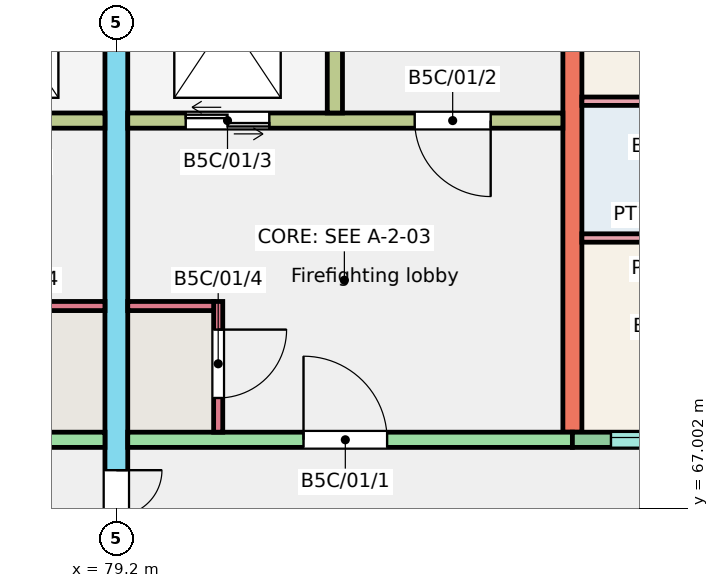
"""IFC4 building model, lengths in metres.
Left out: names, types, materials, properties, quantities, classifications, styles, units other than length and angle.
Written with IfcOpenShell. Run it as: python <this file> out.ifc"""

import sys

from ifc_helpers import new_model, si_unit, direction, frame, frame_2d, origin, place, context, subcontext, project, spatial, rectangle, extrude, element, fill, save


model = new_model("IFC4")
c1 = context("Model", 3, precision=1e-05, world=origin(), true_north=direction((0.0, 1.0)))
c2 = subcontext(c1, "Body", "Model", "MODEL_VIEW")
j1 = project(units=[si_unit("LENGTHUNIT", "METRE"), si_unit("PLANEANGLEUNIT", "RADIAN")], contexts=[c1])
p1 = place(None, origin())
s1 = spatial("IfcSite", under=j1, at=p1, CompositionType="ELEMENT")
p2 = place(p1, origin())
s2 = spatial("IfcBuilding", under=s1, at=p2, CompositionType="ELEMENT")
p3 = place(p2, frame((0.0, 0.0, 3.0)))
s3 = spatial("IfcBuildingStorey", under=s2, at=p3, CompositionType="ELEMENT", Elevation=3.0)
p4 = place(p3, frame((79.2, 66.0, 0.0), z_axis=(0.0, 0.0, 1.0), x_axis=(0.0, 1.0, 0.0)))
e1 = element("IfcWall", 1, at=p4, inside=s3, PredefinedType="SHEAR", context=c2, shape_type="SweptSolid", body=[
    extrude(rectangle(XDim=11.0, YDim=0.3, at=frame_2d((5.5, 0.0))), origin(), (0.0, 0.0, 1.0), 3.0),
])
p5 = place(p4, frame((0.3, 0.0, 0.0)))
e2 = element("IfcOpeningElement", 2, at=p5, cuts=e1, PredefinedType="OPENING", context=c2, shape_type="SweptSolid", body=[
    extrude(rectangle(XDim=1.2, YDim=2.1, at=frame_2d((0.6, 1.05))), frame((0.0, 0.16, 0.0), z_axis=(0.0, -1.0, 0.0), x_axis=(1.0, 0.0, 0.0)), (0.0, 0.0, 1.0), 0.32),
])
p6 = place(p3, frame((85.2, 68.0, 0.0), z_axis=(0.0, 0.0, 1.0), x_axis=(0.0, 1.0, 0.0)))
e3 = element("IfcWall", 3, at=p6, inside=s3, PredefinedType="SHEAR", context=c2, shape_type="SweptSolid", body=[
    extrude(rectangle(XDim=9.0, YDim=0.25, at=frame_2d((4.5, 0.0))), origin(), (0.0, 0.0, 1.0), 3.0),
])
p7 = place(p3, frame((73.2, 67.9, 0.0), z_axis=(0.0, 0.0, 1.0), x_axis=(1.0, 0.0, 0.0)))
e4 = element("IfcWall", 4, at=p7, inside=s3, PredefinedType="SHEAR", context=c2, shape_type="SweptSolid", body=[
    extrude(rectangle(XDim=5.85, YDim=0.2, at=frame_2d((2.925, 0.0))), origin(), (0.0, 0.0, 1.0), 3.0),
])
p8 = place(p7, frame((2.438, 0.0, 0.0)))
e5 = element("IfcOpeningElement", 5, at=p8, cuts=e4, PredefinedType="OPENING", context=c2, shape_type="SweptSolid", body=[
    extrude(rectangle(XDim=1.1, YDim=2.1, at=frame_2d((0.55, 1.05))), frame((0.0, 0.11, 0.0), z_axis=(0.0, -1.0, 0.0), x_axis=(1.0, 0.0, 0.0)), (0.0, 0.0, 1.0), 0.22),
])
p9 = place(p3, frame((73.325, 72.1, 0.0), z_axis=(0.0, 0.0, 1.0), x_axis=(1.0, 0.0, 0.0)))
e6 = element("IfcWall", 6, at=p9, inside=s3, PredefinedType="SHEAR", context=c2, shape_type="SweptSolid", body=[
    extrude(rectangle(XDim=5.725, YDim=0.2, at=frame_2d((2.863, 0.0))), origin(), (0.0, 0.0, 1.0), 3.0),
])
p10 = place(p9, frame((0.95, 0.0, 0.0)))
e7 = element("IfcOpeningElement", 7, at=p10, cuts=e6, PredefinedType="OPENING", context=c2, shape_type="SweptSolid", body=[
    extrude(rectangle(XDim=1.0, YDim=2.1, at=frame_2d((0.5, 1.05))), frame((0.0, 0.11, 0.0), z_axis=(0.0, -1.0, 0.0), x_axis=(1.0, 0.0, 0.0)), (0.0, 0.0, 1.0), 0.22),
])
p11 = place(p9, frame((3.863, 0.0, 0.0)))
e8 = element("IfcOpeningElement", 8, at=p11, cuts=e6, PredefinedType="OPENING", context=c2, shape_type="SweptSolid", body=[
    extrude(rectangle(XDim=1.1, YDim=2.1, at=frame_2d((0.55, 1.05))), frame((0.0, 0.11, 0.0), z_axis=(0.0, -1.0, 0.0), x_axis=(1.0, 0.0, 0.0)), (0.0, 0.0, 1.0), 0.22),
])
p12 = place(p3, frame((77.92, 69.66, 0.0), z_axis=(0.0, 0.0, 1.0), x_axis=(1.0, 0.0, 0.0)))
e9 = element("IfcWall", 9, at=p12, inside=s3, PredefinedType="SHEAR", context=c2, shape_type="SweptSolid", body=[
    extrude(rectangle(XDim=1.13, YDim=0.12, at=frame_2d((0.565, 0.0))), origin(), (0.0, 0.0, 1.0), 3.0),
])
p13 = place(p3, frame((79.35, 67.9, 0.0), z_axis=(0.0, 0.0, 1.0), x_axis=(1.0, 0.0, 0.0)))
e10 = element("IfcWall", 10, at=p13, inside=s3, PredefinedType="SHEAR", context=c2, shape_type="SweptSolid", body=[
    extrude(rectangle(XDim=5.85, YDim=0.2, at=frame_2d((2.925, 0.0))), origin(), (0.0, 0.0, 1.0), 3.0),
])
p14 = place(p13, frame((2.312, 0.0, 0.0)))
e11 = element("IfcOpeningElement", 11, at=p14, cuts=e10, PredefinedType="OPENING", context=c2, shape_type="SweptSolid", body=[
    extrude(rectangle(XDim=1.1, YDim=2.1, at=frame_2d((0.55, 1.05))), frame((0.0, 0.11, 0.0), z_axis=(0.0, -1.0, 0.0), x_axis=(1.0, 0.0, 0.0)), (0.0, 0.0, 1.0), 0.22),
])
p15 = place(p3, frame((79.35, 72.1, 0.0), z_axis=(0.0, 0.0, 1.0), x_axis=(1.0, 0.0, 0.0)))
e12 = element("IfcWall", 12, at=p15, inside=s3, PredefinedType="SHEAR", context=c2, shape_type="SweptSolid", body=[
    extrude(rectangle(XDim=5.725, YDim=0.2, at=frame_2d((2.862, 0.0))), origin(), (0.0, 0.0, 1.0), 3.0),
])
p16 = place(p15, frame((3.775, 0.0, 0.0)))
e13 = element("IfcOpeningElement", 13, at=p16, cuts=e12, PredefinedType="OPENING", context=c2, shape_type="SweptSolid", body=[
    extrude(rectangle(XDim=1.0, YDim=2.1, at=frame_2d((0.5, 1.05))), frame((0.0, 0.11, 0.0), z_axis=(0.0, -1.0, 0.0), x_axis=(1.0, 0.0, 0.0)), (0.0, 0.0, 1.0), 0.22),
])
p17 = place(p15, frame((0.762, 0.0, 0.0)))
e14 = element("IfcOpeningElement", 14, at=p17, cuts=e12, PredefinedType="OPENING", context=c2, shape_type="SweptSolid", body=[
    extrude(rectangle(XDim=1.1, YDim=2.1, at=frame_2d((0.55, 1.05))), frame((0.0, 0.11, 0.0), z_axis=(0.0, -1.0, 0.0), x_axis=(1.0, 0.0, 0.0)), (0.0, 0.0, 1.0), 0.22),
])
p18 = place(p3, frame((82.075, 72.2, 0.0), z_axis=(0.0, 0.0, 1.0), x_axis=(0.0, 1.0, 0.0)))
e15 = element("IfcWall", 15, at=p18, inside=s3, PredefinedType="SHEAR", context=c2, shape_type="SweptSolid", body=[
    extrude(rectangle(XDim=4.8, YDim=0.2, at=frame_2d((2.4, 0.0))), origin(), (0.0, 0.0, 1.0), 3.0),
])
p19 = place(p3, frame((80.54, 68.0, 0.0), z_axis=(0.0, 0.0, 1.0), x_axis=(0.0, 1.0, 0.0)))
e16 = element("IfcWall", 16, at=p19, inside=s3, PredefinedType="SHEAR", context=c2, shape_type="SweptSolid", body=[
    extrude(rectangle(XDim=1.72, YDim=0.12, at=frame_2d((0.86, 0.0))), origin(), (0.0, 0.0, 1.0), 3.0),
])
p20 = place(p19, frame((0.45, 0.0, 0.0)))
e17 = element("IfcOpeningElement", 17, at=p20, cuts=e16, PredefinedType="OPENING", context=c2, shape_type="SweptSolid", body=[
    extrude(rectangle(XDim=0.9, YDim=2.1, at=frame_2d((0.45, 1.05))), frame((0.0, 0.07, 0.0), z_axis=(0.0, -1.0, 0.0), x_axis=(1.0, 0.0, 0.0)), (0.0, 0.0, 1.0), 0.14),
])
p21 = place(p3, frame((79.35, 69.66, 0.0), z_axis=(0.0, 0.0, 1.0), x_axis=(1.0, 0.0, 0.0)))
e18 = element("IfcWall", 18, at=p21, inside=s3, PredefinedType="SHEAR", context=c2, shape_type="SweptSolid", body=[
    extrude(rectangle(XDim=1.13, YDim=0.12, at=frame_2d((0.565, 0.0))), origin(), (0.0, 0.0, 1.0), 3.0),
])
p22 = place(p3, frame((85.2, 67.9, 0.0), z_axis=(0.0, 0.0, 1.0), x_axis=(1.0, 0.0, 0.0)))
e19 = element("IfcWall", 19, at=p22, inside=s3, PredefinedType="SOLIDWALL", context=c2, shape_type="SweptSolid", body=[
    extrude(rectangle(XDim=3.6, YDim=0.2, at=frame_2d((1.8, 0.0))), origin(), (0.0, 0.0, 1.0), 3.0),
])
p23 = place(p22, frame((0.508, 0.0, 1.1)))
e20 = element("IfcOpeningElement", 20, at=p23, cuts=e19, PredefinedType="OPENING", context=c2, shape_type="SweptSolid", body=[
    extrude(rectangle(XDim=1.2, YDim=1.3, at=frame_2d((0.6, 0.65))), frame((0.0, 0.11, 0.0), z_axis=(0.0, -1.0, 0.0), x_axis=(1.0, 0.0, 0.0)), (0.0, 0.0, 1.0), 0.22),
])
p24 = place(p22, frame((2.35, 0.0, 0.0)))
e21 = element("IfcOpeningElement", 21, at=p24, cuts=e19, PredefinedType="OPENING", context=c2, shape_type="SweptSolid", body=[
    extrude(rectangle(XDim=1.0, YDim=2.1, at=frame_2d((0.5, 1.05))), frame((0.0, 0.11, 0.0), z_axis=(0.0, -1.0, 0.0), x_axis=(1.0, 0.0, 0.0)), (0.0, 0.0, 1.0), 0.22),
])
p25 = place(p3, frame((85.325, 70.555, 0.0), z_axis=(0.0, 0.0, 1.0), x_axis=(1.0, 0.0, 0.0)))
e22 = element("IfcWall", 22, at=p25, inside=s3, PredefinedType="PARTITIONING", context=c2, shape_type="SweptSolid", body=[
    extrude(rectangle(XDim=1.965, YDim=0.11, at=frame_2d((0.982, 0.0))), origin(), (0.0, 0.0, 1.0), 2.8),
])
p26 = place(p3, frame((85.325, 72.355, 0.0), z_axis=(0.0, 0.0, 1.0), x_axis=(1.0, 0.0, 0.0)))
e23 = element("IfcWall", 23, at=p26, inside=s3, PredefinedType="PARTITIONING", context=c2, shape_type="SweptSolid", body=[
    extrude(rectangle(XDim=3.375, YDim=0.11, at=frame_2d((1.688, 0.0))), origin(), (0.0, 0.0, 1.0), 2.8),
])
p27 = place(p26, frame((2.275, 0.0, 0.0)))
e24 = element("IfcOpeningElement", 24, at=p27, cuts=e23, PredefinedType="OPENING", context=c2, shape_type="SweptSolid", body=[
    extrude(rectangle(XDim=0.9, YDim=2.1, at=frame_2d((0.45, 1.05))), frame((0.0, 0.065, 0.0), z_axis=(0.0, -1.0, 0.0), x_axis=(1.0, 0.0, 0.0)), (0.0, 0.0, 1.0), 0.13),
])
p28 = place(p23, origin())
e25 = element("IfcWindow", 25, at=p28, inside=s3, PartitioningType="SINGLE_PANEL", PredefinedType="WINDOW", context=c2, shape_type="SweptSolid", body=[
    extrude(rectangle(XDim=1.2, YDim=1.3, at=frame_2d((0.6, 0.65))), frame((0.0, 0.06, 0.0), z_axis=(0.0, -1.0, 0.0), x_axis=(1.0, 0.0, 0.0)), (0.0, 0.0, 1.0), 0.06),
])
fill(e20, e25)
p29 = place(p14, origin())
e26 = element("IfcDoor", 26, at=p29, inside=s3, OperationType="SINGLE_SWING_LEFT", PredefinedType="DOOR", context=c2, shape_type="SweptSolid", body=[
    extrude(rectangle(XDim=1.1, YDim=2.1, at=frame_2d((0.55, 1.05))), frame((0.0, 0.025, 0.0), z_axis=(0.0, -1.0, 0.0), x_axis=(1.0, 0.0, 0.0)), (0.0, 0.0, 1.0), 0.05),
])
fill(e11, e26)
p30 = place(p16, origin())
e27 = element("IfcDoor", 27, at=p30, inside=s3, OperationType="SINGLE_SWING_RIGHT", PredefinedType="DOOR", context=c2, shape_type="SweptSolid", body=[
    extrude(rectangle(XDim=1.0, YDim=2.1, at=frame_2d((0.5, 1.05))), frame((0.0, 0.025, 0.0), z_axis=(0.0, -1.0, 0.0), x_axis=(1.0, 0.0, 0.0)), (0.0, 0.0, 1.0), 0.05),
])
fill(e13, e27)
p31 = place(p17, origin())
e28 = element("IfcDoor", 28, at=p31, inside=s3, OperationType="DOUBLE_DOOR_SLIDING", PredefinedType="DOOR", context=c2, shape_type="SweptSolid", body=[
    extrude(rectangle(XDim=1.1, YDim=2.1, at=frame_2d((0.55, 1.05))), frame((0.0, 0.025, 0.0), z_axis=(0.0, -1.0, 0.0), x_axis=(1.0, 0.0, 0.0)), (0.0, 0.0, 1.0), 0.05),
])
fill(e14, e28)
p32 = place(p20, origin())
e29 = element("IfcDoor", 29, at=p32, inside=s3, OperationType="SINGLE_SWING_RIGHT", PredefinedType="DOOR", context=c2, shape_type="SweptSolid", body=[
    extrude(rectangle(XDim=0.9, YDim=2.1, at=frame_2d((0.45, 1.05))), frame((0.0, 0.025, 0.0), z_axis=(0.0, -1.0, 0.0), x_axis=(1.0, 0.0, 0.0)), (0.0, 0.0, 1.0), 0.05),
])
fill(e17, e29)
p33 = place(p5, origin())
e30 = element("IfcDoor", 30, at=p33, inside=s3, OperationType="DOUBLE_DOOR_SINGLE_SWING", PredefinedType="DOOR", context=c2, shape_type="SweptSolid", body=[
    extrude(rectangle(XDim=1.2, YDim=2.1, at=frame_2d((0.6, 1.05))), frame((0.0, 0.025, 0.0), z_axis=(0.0, -1.0, 0.0), x_axis=(1.0, 0.0, 0.0)), (0.0, 0.0, 1.0), 0.05),
])
fill(e2, e30)
save(model, sys.argv[1])
